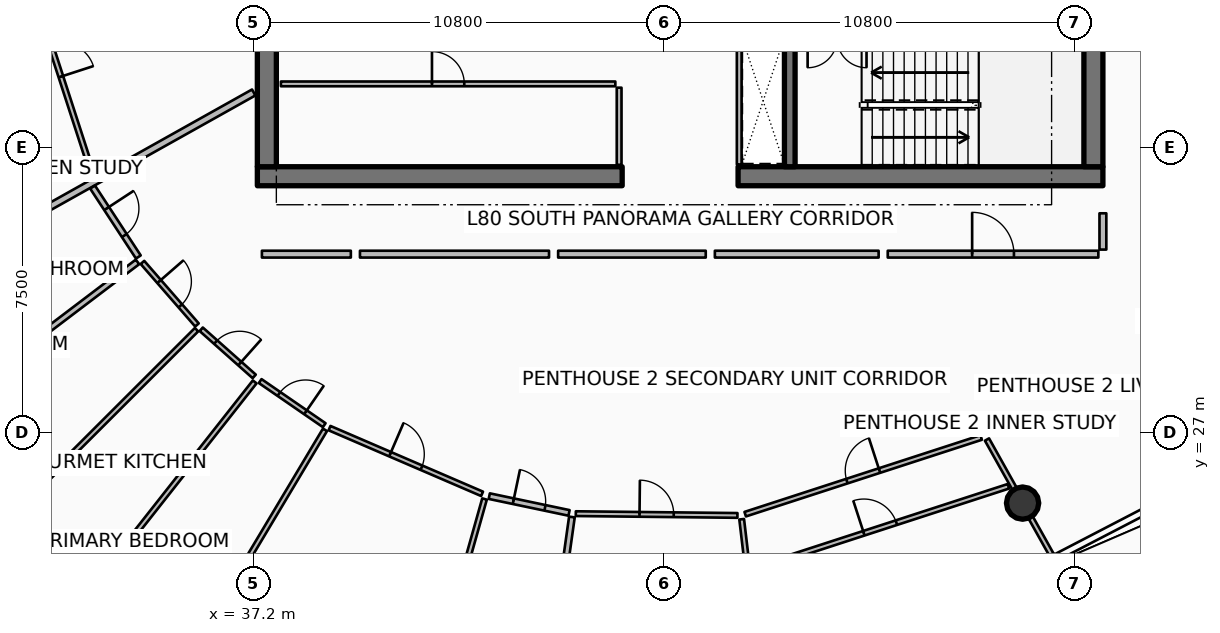
"""IFC4 building model, lengths in metres.
Left out: names, types, materials, properties, quantities, classifications, styles, units other than length and angle.
Written with IfcOpenShell. Run it as: python <this file> out.ifc"""

import sys

from ifc_helpers import new_model, si_unit, direction, frame, frame_2d, origin, origin_2d, place, context, subcontext, project, spatial, rectangle, circle, extrude, element, fill, save


model = new_model("IFC4")
c1 = context("Model", 3, precision=1e-05, world=origin(), true_north=direction((0.0, 1.0)))
c2 = subcontext(c1, "Body", "Model", "MODEL_VIEW")
j1 = project(units=[si_unit("LENGTHUNIT", "METRE"), si_unit("PLANEANGLEUNIT", "RADIAN")], contexts=[c1])
p1 = place(None, origin())
s1 = spatial("IfcSite", under=j1, at=p1, CompositionType="ELEMENT")
p2 = place(p1, origin())
s2 = spatial("IfcBuilding", under=s1, at=p2, CompositionType="ELEMENT")
p3 = place(p2, frame((0.0, 0.0, 317.9)))
s3 = spatial("IfcBuildingStorey", under=s2, at=p3, CompositionType="ELEMENT", Elevation=317.9)
p4 = place(p3, frame((37.3, 33.75, 0.0), z_axis=(0.0, 0.0, 1.0), x_axis=(1.0, 0.0, 0.0)))
e1 = element("IfcWall", 1, at=p4, inside=s3, PredefinedType="SHEAR", context=c2, shape_type="SweptSolid", body=[
    extrude(rectangle(XDim=9.6, YDim=0.5, at=frame_2d((4.8, 0.0))), origin(), (0.0, 0.0, 1.0), 4.2),
])
p5 = place(p3, frame((49.95, 33.75, 0.0), z_axis=(0.0, 0.0, 1.0), x_axis=(1.0, 0.0, 0.0)))
e2 = element("IfcWall", 2, at=p5, inside=s3, PredefinedType="SHEAR", context=c2, shape_type="SweptSolid", body=[
    extrude(rectangle(XDim=9.6, YDim=0.5, at=frame_2d((4.8, 0.0))), origin(), (0.0, 0.0, 1.0), 4.2),
])
for number, where, z_axis, x_axis in (
    (3, (37.55, 34.0, 0.0), (0.0, 0.0, 1.0), (0.0, 1.0, 0.0)),
    (4, (59.3, 34.0, 0.0), (0.0, 0.0, 1.0), (0.0, 1.0, 0.0)),
):
    element("IfcWall", number, at=place(p3, frame(where, z_axis=z_axis, x_axis=x_axis)), inside=s3, PredefinedType="SHEAR", context=c2, shape_type="SweptSolid", body=[
        extrude(rectangle(XDim=16.0, YDim=0.5, at=frame_2d((8.0, 0.0))), origin(), (0.0, 0.0, 1.0), 4.2),
    ])
p6 = place(p3, frame((51.31, 34.0, 0.0), z_axis=(0.0, 0.0, 1.0), x_axis=(0.0, 1.0, 0.0)))
e5 = element("IfcWall", 5, at=p6, inside=s3, PredefinedType="SHEAR", context=c2, shape_type="SweptSolid", body=[
    extrude(rectangle(XDim=3.5, YDim=0.28, at=frame_2d((1.75, 0.0))), origin(), (0.0, 0.0, 1.0), 4.2),
])
for number, where, z_axis, x_axis in (
    (6, (33.684, 23.841, 0.0), (0.0, 0.0, 1.0), (1.0, 0.0, 0.0)),
    (7, (57.437, 25.149, 0.0), (0.0, 0.0, 1.0), (1.0, 0.0, 0.0)),
):
    element("IfcColumn", number, at=place(p3, frame(where, z_axis=z_axis, x_axis=x_axis)), inside=s3, PredefinedType="COLUMN", context=c2, shape_type="SweptSolid", body=[
        extrude(circle(Radius=0.425, at=origin_2d()), origin(), (0.0, 0.0, 1.0), 3.94),
    ])
p7 = place(p3, frame((46.82, 34.05, 0.0), z_axis=(0.0, 0.0, 1.0), x_axis=(0.0, 1.0, 0.0)))
e8 = element("IfcWall", 8, at=p7, inside=s3, PredefinedType="PARTITIONING", context=c2, shape_type="SweptSolid", body=[
    extrude(rectangle(XDim=2.03, YDim=0.125, at=frame_2d((1.015, 0.0))), origin(), (0.0, 0.0, 1.0), 3.38),
])
p8 = place(p3, frame((37.92, 36.18, 0.0), z_axis=(0.0, 0.0, 1.0), x_axis=(1.0, 0.0, 0.0)))
e9 = element("IfcWall", 9, at=p8, inside=s3, PredefinedType="PARTITIONING", context=c2, shape_type="SweptSolid", body=[
    extrude(rectangle(XDim=8.8, YDim=0.125, at=frame_2d((4.4, 0.0))), origin(), (0.0, 0.0, 1.0), 3.38),
])
p9 = place(p8, frame((3.975, 0.0, 0.0)))
e10 = element("IfcOpeningElement", 10, at=p9, cuts=e9, PredefinedType="OPENING", context=c2, shape_type="SweptSolid", body=[
    extrude(rectangle(XDim=0.85, YDim=2.06, at=frame_2d((0.425, 1.03))), frame((0.0, 0.073, 0.0), z_axis=(0.0, -1.0, 0.0), x_axis=(1.0, 0.0, 0.0)), (0.0, 0.0, 1.0), 0.145),
])
p10 = place(p3, frame((49.98, 34.06, 0.0), z_axis=(0.0, 0.0, 1.0), x_axis=(0.0, 1.0, 0.0)))
e11 = element("IfcWall", 11, at=p10, inside=s3, PredefinedType="PARTITIONING", context=c2, shape_type="SweptSolid", body=[
    extrude(rectangle(XDim=3.4, YDim=0.125, at=frame_2d((1.7, 0.0))), origin(), (0.0, 0.0, 1.0), 3.38),
])
p11 = place(p3, frame((37.204, 35.954, 0.0), z_axis=(0.0, 0.0, 1.0), x_axis=(-0.872495191914, -0.488622697064, 0.0)))
e12 = element("IfcWall", 12, at=p11, inside=s3, PredefinedType="PARTITIONING", context=c2, shape_type="SweptSolid", body=[
    extrude(rectangle(XDim=13.462, YDim=0.18, at=frame_2d((6.731, 0.0))), origin(), (0.0, 0.0, 1.0), 3.38),
])
p12 = place(p3, frame((30.99, 39.878, 0.0), z_axis=(0.0, 0.0, 1.0), x_axis=(0.309026406972, -0.951053457905, 0.0)))
e13 = element("IfcWall", 13, at=p12, inside=s3, PredefinedType="PARTITIONING", context=c2, shape_type="SweptSolid", body=[
    extrude(rectangle(XDim=6.477, YDim=0.125, at=frame_2d((3.238, 0.0))), origin(), (0.0, 0.0, 1.0), 3.38),
])
p13 = place(p12, frame((2.788, 0.0, 0.0)))
e14 = element("IfcOpeningElement", 14, at=p13, cuts=e13, PredefinedType="OPENING", context=c2, shape_type="SweptSolid", body=[
    extrude(rectangle(XDim=0.9, YDim=2.08, at=frame_2d((0.45, 1.04))), frame((0.0, 0.073, 0.0), z_axis=(0.0, -1.0, 0.0), x_axis=(1.0, 0.0, 0.0)), (0.0, 0.0, 1.0), 0.145),
])
p14 = place(p3, frame((53.888, 31.7, 0.0), z_axis=(0.0, 0.0, 1.0), x_axis=(1.0, 0.0, 0.0)))
e15 = element("IfcWall", 15, at=p14, inside=s3, PredefinedType="PARTITIONING", context=c2, shape_type="SweptSolid", body=[
    extrude(rectangle(XDim=5.542, YDim=0.18, at=frame_2d((2.771, 0.0))), origin(), (0.0, 0.0, 1.0), 3.38),
])
p15 = place(p14, frame((2.221, 0.0, 0.0)))
e16 = element("IfcOpeningElement", 16, at=p15, cuts=e15, PredefinedType="OPENING", context=c2, shape_type="SweptSolid", body=[
    extrude(rectangle(XDim=1.1, YDim=2.1, at=frame_2d((0.55, 1.05))), frame((0.0, 0.1, 0.0), z_axis=(0.0, -1.0, 0.0), x_axis=(1.0, 0.0, 0.0)), (0.0, 0.0, 1.0), 0.2),
])
p16 = place(p3, frame((59.55, 31.82, 0.0), z_axis=(0.0, 0.0, 1.0), x_axis=(0.0, 1.0, 0.0)))
e17 = element("IfcWall", 17, at=p16, inside=s3, PredefinedType="PARTITIONING", context=c2, shape_type="SweptSolid", body=[
    extrude(rectangle(XDim=0.955, YDim=0.18, at=frame_2d((0.477, 0.0))), origin(), (0.0, 0.0, 1.0), 3.38),
])
p17 = place(p3, frame((37.42, 31.7, 0.0), z_axis=(0.0, 0.0, 1.0), x_axis=(1.0, 0.0, 0.0)))
e18 = element("IfcWall", 18, at=p17, inside=s3, PredefinedType="PARTITIONING", context=c2, shape_type="SweptSolid", body=[
    extrude(rectangle(XDim=2.34, YDim=0.18, at=frame_2d((1.17, 0.0))), origin(), (0.0, 0.0, 1.0), 3.38),
])
p18 = place(p3, frame((32.964, 33.465, 0.0), z_axis=(0.0, 0.0, 1.0), x_axis=(0.547736904717, -0.836650633903, 0.0)))
e19 = element("IfcWall", 19, at=p18, inside=s3, PredefinedType="PARTITIONING", context=c2, shape_type="SweptSolid", body=[
    extrude(rectangle(XDim=2.199, YDim=0.15, at=frame_2d((1.099, 0.0))), origin(), (0.0, 0.0, 1.0), 3.38),
])
p19 = place(p18, frame((0.674, 0.0, 0.0)))
e20 = element("IfcOpeningElement", 20, at=p19, cuts=e19, PredefinedType="OPENING", context=c2, shape_type="SweptSolid", body=[
    extrude(rectangle(XDim=0.85, YDim=2.06, at=frame_2d((0.425, 1.03))), frame((0.0, 0.085, 0.0), z_axis=(0.0, -1.0, 0.0), x_axis=(1.0, 0.0, 0.0)), (0.0, 0.0, 1.0), 0.17),
])
p20 = place(p3, frame((34.146, 31.496, 0.0), z_axis=(0.0, 0.0, 1.0), x_axis=(-0.796862333182, -0.60416092389, 0.0)))
e21 = element("IfcWall", 21, at=p20, inside=s3, PredefinedType="PARTITIONING", context=c2, shape_type="SweptSolid", body=[
    extrude(rectangle(XDim=3.72, YDim=0.15, at=frame_2d((1.86, 0.0))), origin(), (0.0, 0.0, 1.0), 3.38),
])
p21 = place(p3, frame((35.7, 29.713, 0.0), z_axis=(0.0, 0.0, 1.0), x_axis=(-0.707470011435, -0.706743364256, 0.0)))
e22 = element("IfcWall", 22, at=p21, inside=s3, PredefinedType="PARTITIONING", context=c2, shape_type="SweptSolid", body=[
    extrude(rectangle(XDim=7.728, YDim=0.125, at=frame_2d((3.864, 0.0))), origin(), (0.0, 0.0, 1.0), 3.38),
])
p22 = place(p3, frame((34.277, 31.482, 0.0), z_axis=(0.0, 0.0, 1.0), x_axis=(0.656959210167, -0.753926121167, 0.0)))
e23 = element("IfcWall", 23, at=p22, inside=s3, PredefinedType="PARTITIONING", context=c2, shape_type="SweptSolid", body=[
    extrude(rectangle(XDim=2.183, YDim=0.125, at=frame_2d((1.091, 0.0))), origin(), (0.0, 0.0, 1.0), 3.38),
])
p23 = place(p22, frame((0.667, 0.0, 0.0)))
e24 = element("IfcOpeningElement", 24, at=p23, cuts=e23, PredefinedType="OPENING", context=c2, shape_type="SweptSolid", body=[
    extrude(rectangle(XDim=0.85, YDim=2.06, at=frame_2d((0.425, 1.03))), frame((0.0, 0.073, 0.0), z_axis=(0.0, -1.0, 0.0), x_axis=(1.0, 0.0, 0.0)), (0.0, 0.0, 1.0), 0.145),
])
p24 = place(p3, frame((35.823, 29.723, 0.0), z_axis=(0.0, 0.0, 1.0), x_axis=(0.747438201164, -0.664331344617, 0.0)))
e25 = element("IfcWall", 25, at=p24, inside=s3, PredefinedType="PARTITIONING", context=c2, shape_type="SweptSolid", body=[
    extrude(rectangle(XDim=1.865, YDim=0.125, at=frame_2d((0.933, 0.0))), origin(), (0.0, 0.0, 1.0), 3.38),
])
p25 = place(p24, frame((0.508, 0.0, 0.0)))
e26 = element("IfcOpeningElement", 26, at=p25, cuts=e25, PredefinedType="OPENING", context=c2, shape_type="SweptSolid", body=[
    extrude(rectangle(XDim=0.85, YDim=2.06, at=frame_2d((0.425, 1.03))), frame((0.0, 0.073, 0.0), z_axis=(0.0, -1.0, 0.0), x_axis=(1.0, 0.0, 0.0)), (0.0, 0.0, 1.0), 0.145),
])
p26 = place(p3, frame((40.0, 31.7, 0.0), z_axis=(0.0, 0.0, 1.0), x_axis=(1.0, 0.0, 0.0)))
e27 = element("IfcWall", 27, at=p26, inside=s3, PredefinedType="PARTITIONING", context=c2, shape_type="SweptSolid", body=[
    extrude(rectangle(XDim=4.975, YDim=0.18, at=frame_2d((2.488, 0.0))), origin(), (0.0, 0.0, 1.0), 3.38),
])
p27 = place(p3, frame((37.23, 28.339, 0.0), z_axis=(0.0, 0.0, 1.0), x_axis=(-0.619087123863, -0.785322311581, 0.0)))
e28 = element("IfcWall", 28, at=p27, inside=s3, PredefinedType="PARTITIONING", context=c2, shape_type="SweptSolid", body=[
    extrude(rectangle(XDim=7.731, YDim=0.125, at=frame_2d((3.865, 0.0))), origin(), (0.0, 0.0, 1.0), 3.38),
])
p28 = place(p3, frame((39.079, 27.077, 0.0), z_axis=(0.0, 0.0, 1.0), x_axis=(-0.513104404823, -0.858326202414, 0.0)))
e29 = element("IfcWall", 29, at=p28, inside=s3, PredefinedType="PARTITIONING", context=c2, shape_type="SweptSolid", body=[
    extrude(rectangle(XDim=6.48, YDim=0.125, at=frame_2d((3.24, 0.0))), origin(), (0.0, 0.0, 1.0), 3.38),
])
p29 = place(p3, frame((37.375, 28.361, 0.0), z_axis=(0.0, 0.0, 1.0), x_axis=(0.823529894266, -0.567272873712, 0.0)))
e30 = element("IfcWall", 30, at=p29, inside=s3, PredefinedType="PARTITIONING", context=c2, shape_type="SweptSolid", body=[
    extrude(rectangle(XDim=2.046, YDim=0.125, at=frame_2d((1.023, 0.0))), origin(), (0.0, 0.0, 1.0), 3.38),
])
p30 = place(p29, frame((0.598, 0.0, 0.0)))
e31 = element("IfcOpeningElement", 31, at=p30, cuts=e30, PredefinedType="OPENING", context=c2, shape_type="SweptSolid", body=[
    extrude(rectangle(XDim=0.85, YDim=2.06, at=frame_2d((0.425, 1.03))), frame((0.0, 0.073, 0.0), z_axis=(0.0, -1.0, 0.0), x_axis=(1.0, 0.0, 0.0)), (0.0, 0.0, 1.0), 0.145),
])
p31 = place(p3, frame((39.199, 27.123, 0.0), z_axis=(0.0, 0.0, 1.0), x_axis=(0.918386386282, -0.395684780466, 0.0)))
e32 = element("IfcWall", 32, at=p31, inside=s3, PredefinedType="PARTITIONING", context=c2, shape_type="SweptSolid", body=[
    extrude(rectangle(XDim=4.371, YDim=0.125, at=frame_2d((2.186, 0.0))), origin(), (0.0, 0.0, 1.0), 3.38),
])
p32 = place(p31, frame((1.736, 0.0, 0.0)))
e33 = element("IfcOpeningElement", 33, at=p32, cuts=e32, PredefinedType="OPENING", context=c2, shape_type="SweptSolid", body=[
    extrude(rectangle(XDim=0.9, YDim=2.08, at=frame_2d((0.45, 1.04))), frame((0.0, 0.073, 0.0), z_axis=(0.0, -1.0, 0.0), x_axis=(1.0, 0.0, 0.0)), (0.0, 0.0, 1.0), 0.145),
])
p33 = place(p3, frame((45.215, 31.7, 0.0), z_axis=(0.0, 0.0, 1.0), x_axis=(1.0, 0.0, 0.0)))
e34 = element("IfcWall", 34, at=p33, inside=s3, PredefinedType="PARTITIONING", context=c2, shape_type="SweptSolid", body=[
    extrude(rectangle(XDim=3.884, YDim=0.18, at=frame_2d((1.942, 0.0))), origin(), (0.0, 0.0, 1.0), 3.38),
])
p34 = place(p3, frame((43.278, 25.257, 0.0), z_axis=(0.0, 0.0, 1.0), x_axis=(-0.271458055223, -0.962450271055, 0.0)))
e35 = element("IfcWall", 35, at=p34, inside=s3, PredefinedType="PARTITIONING", context=c2, shape_type="SweptSolid", body=[
    extrude(rectangle(XDim=5.497, YDim=0.125, at=frame_2d((2.749, 0.0))), origin(), (0.0, 0.0, 1.0), 3.38),
])
p35 = place(p3, frame((43.403, 25.333, 0.0), z_axis=(0.0, 0.0, 1.0), x_axis=(0.978565484163, -0.205935895864, 0.0)))
e36 = element("IfcWall", 36, at=p35, inside=s3, PredefinedType="PARTITIONING", context=c2, shape_type="SweptSolid", body=[
    extrude(rectangle(XDim=2.145, YDim=0.15, at=frame_2d((1.072, 0.0))), origin(), (0.0, 0.0, 1.0), 3.38),
])
p36 = place(p35, frame((0.647, 0.0, 0.0)))
e37 = element("IfcOpeningElement", 37, at=p36, cuts=e36, PredefinedType="OPENING", context=c2, shape_type="SweptSolid", body=[
    extrude(rectangle(XDim=0.85, YDim=2.06, at=frame_2d((0.425, 1.03))), frame((0.0, 0.085, 0.0), z_axis=(0.0, -1.0, 0.0), x_axis=(1.0, 0.0, 0.0)), (0.0, 0.0, 1.0), 0.17),
])
p37 = place(p3, frame((45.577, 24.784, 0.0), z_axis=(0.0, 0.0, 1.0), x_axis=(-0.139343441712, -0.99024411397, 0.0)))
e38 = element("IfcWall", 38, at=p37, inside=s3, PredefinedType="PARTITIONING", context=c2, shape_type="SweptSolid", body=[
    extrude(rectangle(XDim=4.475, YDim=0.15, at=frame_2d((2.237, 0.0))), origin(), (0.0, 0.0, 1.0), 3.38),
])
p38 = place(p3, frame((45.68, 24.872, 0.0), z_axis=(0.0, 0.0, 1.0), x_axis=(0.99993989629, -0.010963749724, 0.0)))
e39 = element("IfcWall", 39, at=p38, inside=s3, PredefinedType="PARTITIONING", context=c2, shape_type="SweptSolid", body=[
    extrude(rectangle(XDim=4.253, YDim=0.125, at=frame_2d((2.126, 0.0))), origin(), (0.0, 0.0, 1.0), 3.38),
])
p39 = place(p38, frame((1.677, 0.0, 0.0)))
e40 = element("IfcOpeningElement", 40, at=p39, cuts=e39, PredefinedType="OPENING", context=c2, shape_type="SweptSolid", body=[
    extrude(rectangle(XDim=0.9, YDim=2.08, at=frame_2d((0.45, 1.04))), frame((0.0, 0.073, 0.0), z_axis=(0.0, -1.0, 0.0), x_axis=(1.0, 0.0, 0.0)), (0.0, 0.0, 1.0), 0.145),
])
p40 = place(p3, frame((49.339, 31.7, 0.0), z_axis=(0.0, 0.0, 1.0), x_axis=(1.0, 0.0, 0.0)))
e41 = element("IfcWall", 41, at=p40, inside=s3, PredefinedType="PARTITIONING", context=c2, shape_type="SweptSolid", body=[
    extrude(rectangle(XDim=4.309, YDim=0.18, at=frame_2d((2.155, 0.0))), origin(), (0.0, 0.0, 1.0), 3.38),
])
p41 = place(p3, frame((50.045, 24.725, 0.0), z_axis=(0.0, 0.0, 1.0), x_axis=(0.117544267504, -0.993067643807, 0.0)))
e42 = element("IfcWall", 42, at=p41, inside=s3, PredefinedType="PARTITIONING", context=c2, shape_type="SweptSolid", body=[
    extrude(rectangle(XDim=3.566, YDim=0.125, at=frame_2d((1.783, 0.0))), origin(), (0.0, 0.0, 1.0), 3.38),
])
p42 = place(p3, frame((56.5, 26.822, 0.0), z_axis=(0.0, 0.0, 1.0), x_axis=(0.488618382742, -0.872497608047, 0.0)))
e43 = element("IfcWall", 43, at=p42, inside=s3, PredefinedType="PARTITIONING", context=c2, shape_type="SweptSolid", body=[
    extrude(rectangle(XDim=3.466, YDim=0.125, at=frame_2d((1.733, 0.0))), origin(), (0.0, 0.0, 1.0), 3.38),
])
p43 = place(p3, frame((50.137, 24.858, 0.0), z_axis=(0.0, 0.0, 1.0), x_axis=(0.95106401822, 0.30899390487, 0.0)))
e44 = element("IfcWall", 44, at=p43, inside=s3, PredefinedType="PARTITIONING", context=c2, shape_type="SweptSolid", body=[
    extrude(rectangle(XDim=6.529, YDim=0.125, at=frame_2d((3.264, 0.0))), origin(), (0.0, 0.0, 1.0), 3.38),
])
p44 = place(p43, frame((2.814, 0.0, 0.0)))
e45 = element("IfcOpeningElement", 45, at=p44, cuts=e44, PredefinedType="OPENING", context=c2, shape_type="SweptSolid", body=[
    extrude(rectangle(XDim=0.9, YDim=2.08, at=frame_2d((0.45, 1.04))), frame((0.0, 0.073, 0.0), z_axis=(0.0, -1.0, 0.0), x_axis=(1.0, 0.0, 0.0)), (0.0, 0.0, 1.0), 0.145),
])
p45 = place(p3, frame((50.31, 23.398, 0.0), z_axis=(0.0, 0.0, 1.0), x_axis=(0.951062105288, 0.308999792693, 0.0)))
e46 = element("IfcWall", 46, at=p45, inside=s3, PredefinedType="PARTITIONING", context=c2, shape_type="SweptSolid", body=[
    extrude(rectangle(XDim=7.102, YDim=0.125, at=frame_2d((3.551, 0.0))), origin(), (0.0, 0.0, 1.0), 3.38),
])
p46 = place(p45, frame((3.101, 0.0, 0.0)))
e47 = element("IfcOpeningElement", 47, at=p46, cuts=e46, PredefinedType="OPENING", context=c2, shape_type="SweptSolid", body=[
    extrude(rectangle(XDim=0.9, YDim=2.08, at=frame_2d((0.45, 1.04))), frame((0.0, 0.073, 0.0), z_axis=(0.0, -1.0, 0.0), x_axis=(1.0, 0.0, 0.0)), (0.0, 0.0, 1.0), 0.145),
])
p47 = place(p9, origin())
e48 = element("IfcDoor", 48, at=p47, inside=s3, OperationType="SINGLE_SWING_LEFT", PredefinedType="DOOR", context=c2, shape_type="SweptSolid", body=[
    extrude(rectangle(XDim=0.85, YDim=2.06, at=frame_2d((0.425, 1.03))), frame((0.0, 0.025, 0.0), z_axis=(0.0, -1.0, 0.0), x_axis=(1.0, 0.0, 0.0)), (0.0, 0.0, 1.0), 0.05),
])
fill(e10, e48)
p48 = place(p13, origin())
e49 = element("IfcDoor", 49, at=p48, inside=s3, OperationType="SINGLE_SWING_RIGHT", PredefinedType="DOOR", context=c2, shape_type="SweptSolid", body=[
    extrude(rectangle(XDim=0.9, YDim=2.08, at=frame_2d((0.45, 1.04))), frame((0.0, 0.025, 0.0), z_axis=(0.0, -1.0, 0.0), x_axis=(1.0, 0.0, 0.0)), (0.0, 0.0, 1.0), 0.05),
])
fill(e14, e49)
p49 = place(p15, origin())
e50 = element("IfcDoor", 50, at=p49, inside=s3, OperationType="SINGLE_SWING_LEFT", PredefinedType="DOOR", context=c2, shape_type="SweptSolid", body=[
    extrude(rectangle(XDim=1.1, YDim=2.1, at=frame_2d((0.55, 1.05))), frame((0.0, 0.025, 0.0), z_axis=(0.0, -1.0, 0.0), x_axis=(1.0, 0.0, 0.0)), (0.0, 0.0, 1.0), 0.05),
])
fill(e16, e50)
p50 = place(p19, origin())
e51 = element("IfcDoor", 51, at=p50, inside=s3, OperationType="SINGLE_SWING_LEFT", PredefinedType="DOOR", context=c2, shape_type="SweptSolid", body=[
    extrude(rectangle(XDim=0.85, YDim=2.06, at=frame_2d((0.425, 1.03))), frame((0.0, 0.025, 0.0), z_axis=(0.0, -1.0, 0.0), x_axis=(1.0, 0.0, 0.0)), (0.0, 0.0, 1.0), 0.05),
])
fill(e20, e51)
p51 = place(p23, origin())
e52 = element("IfcDoor", 52, at=p51, inside=s3, OperationType="SINGLE_SWING_LEFT", PredefinedType="DOOR", context=c2, shape_type="SweptSolid", body=[
    extrude(rectangle(XDim=0.85, YDim=2.06, at=frame_2d((0.425, 1.03))), frame((0.0, 0.025, 0.0), z_axis=(0.0, -1.0, 0.0), x_axis=(1.0, 0.0, 0.0)), (0.0, 0.0, 1.0), 0.05),
])
fill(e24, e52)
p52 = place(p25, origin())
e53 = element("IfcDoor", 53, at=p52, inside=s3, OperationType="SINGLE_SWING_RIGHT", PredefinedType="DOOR", context=c2, shape_type="SweptSolid", body=[
    extrude(rectangle(XDim=0.85, YDim=2.06, at=frame_2d((0.425, 1.03))), frame((0.0, 0.025, 0.0), z_axis=(0.0, -1.0, 0.0), x_axis=(1.0, 0.0, 0.0)), (0.0, 0.0, 1.0), 0.05),
])
fill(e26, e53)
p53 = place(p30, origin())
e54 = element("IfcDoor", 54, at=p53, inside=s3, OperationType="SINGLE_SWING_RIGHT", PredefinedType="DOOR", context=c2, shape_type="SweptSolid", body=[
    extrude(rectangle(XDim=0.85, YDim=2.06, at=frame_2d((0.425, 1.03))), frame((0.0, 0.025, 0.0), z_axis=(0.0, -1.0, 0.0), x_axis=(1.0, 0.0, 0.0)), (0.0, 0.0, 1.0), 0.05),
])
fill(e31, e54)
p54 = place(p32, origin())
e55 = element("IfcDoor", 55, at=p54, inside=s3, OperationType="SINGLE_SWING_LEFT", PredefinedType="DOOR", context=c2, shape_type="SweptSolid", body=[
    extrude(rectangle(XDim=0.9, YDim=2.08, at=frame_2d((0.45, 1.04))), frame((0.0, 0.025, 0.0), z_axis=(0.0, -1.0, 0.0), x_axis=(1.0, 0.0, 0.0)), (0.0, 0.0, 1.0), 0.05),
])
fill(e33, e55)
p55 = place(p36, origin())
e56 = element("IfcDoor", 56, at=p55, inside=s3, OperationType="SINGLE_SWING_LEFT", PredefinedType="DOOR", context=c2, shape_type="SweptSolid", body=[
    extrude(rectangle(XDim=0.85, YDim=2.06, at=frame_2d((0.425, 1.03))), frame((0.0, 0.025, 0.0), z_axis=(0.0, -1.0, 0.0), x_axis=(1.0, 0.0, 0.0)), (0.0, 0.0, 1.0), 0.05),
])
fill(e37, e56)
p56 = place(p39, origin())
e57 = element("IfcDoor", 57, at=p56, inside=s3, OperationType="SINGLE_SWING_LEFT", PredefinedType="DOOR", context=c2, shape_type="SweptSolid", body=[
    extrude(rectangle(XDim=0.9, YDim=2.08, at=frame_2d((0.45, 1.04))), frame((0.0, 0.025, 0.0), z_axis=(0.0, -1.0, 0.0), x_axis=(1.0, 0.0, 0.0)), (0.0, 0.0, 1.0), 0.05),
])
fill(e40, e57)
p57 = place(p44, origin())
e58 = element("IfcDoor", 58, at=p57, inside=s3, OperationType="SINGLE_SWING_RIGHT", PredefinedType="DOOR", context=c2, shape_type="SweptSolid", body=[
    extrude(rectangle(XDim=0.9, YDim=2.08, at=frame_2d((0.45, 1.04))), frame((0.0, 0.025, 0.0), z_axis=(0.0, -1.0, 0.0), x_axis=(1.0, 0.0, 0.0)), (0.0, 0.0, 1.0), 0.05),
])
fill(e45, e58)
p58 = place(p46, origin())
e59 = element("IfcDoor", 59, at=p58, inside=s3, OperationType="SINGLE_SWING_LEFT", PredefinedType="DOOR", context=c2, shape_type="SweptSolid", body=[
    extrude(rectangle(XDim=0.9, YDim=2.08, at=frame_2d((0.45, 1.04))), frame((0.0, 0.025, 0.0), z_axis=(0.0, -1.0, 0.0), x_axis=(1.0, 0.0, 0.0)), (0.0, 0.0, 1.0), 0.05),
])
fill(e47, e59)
save(model, sys.argv[1])
